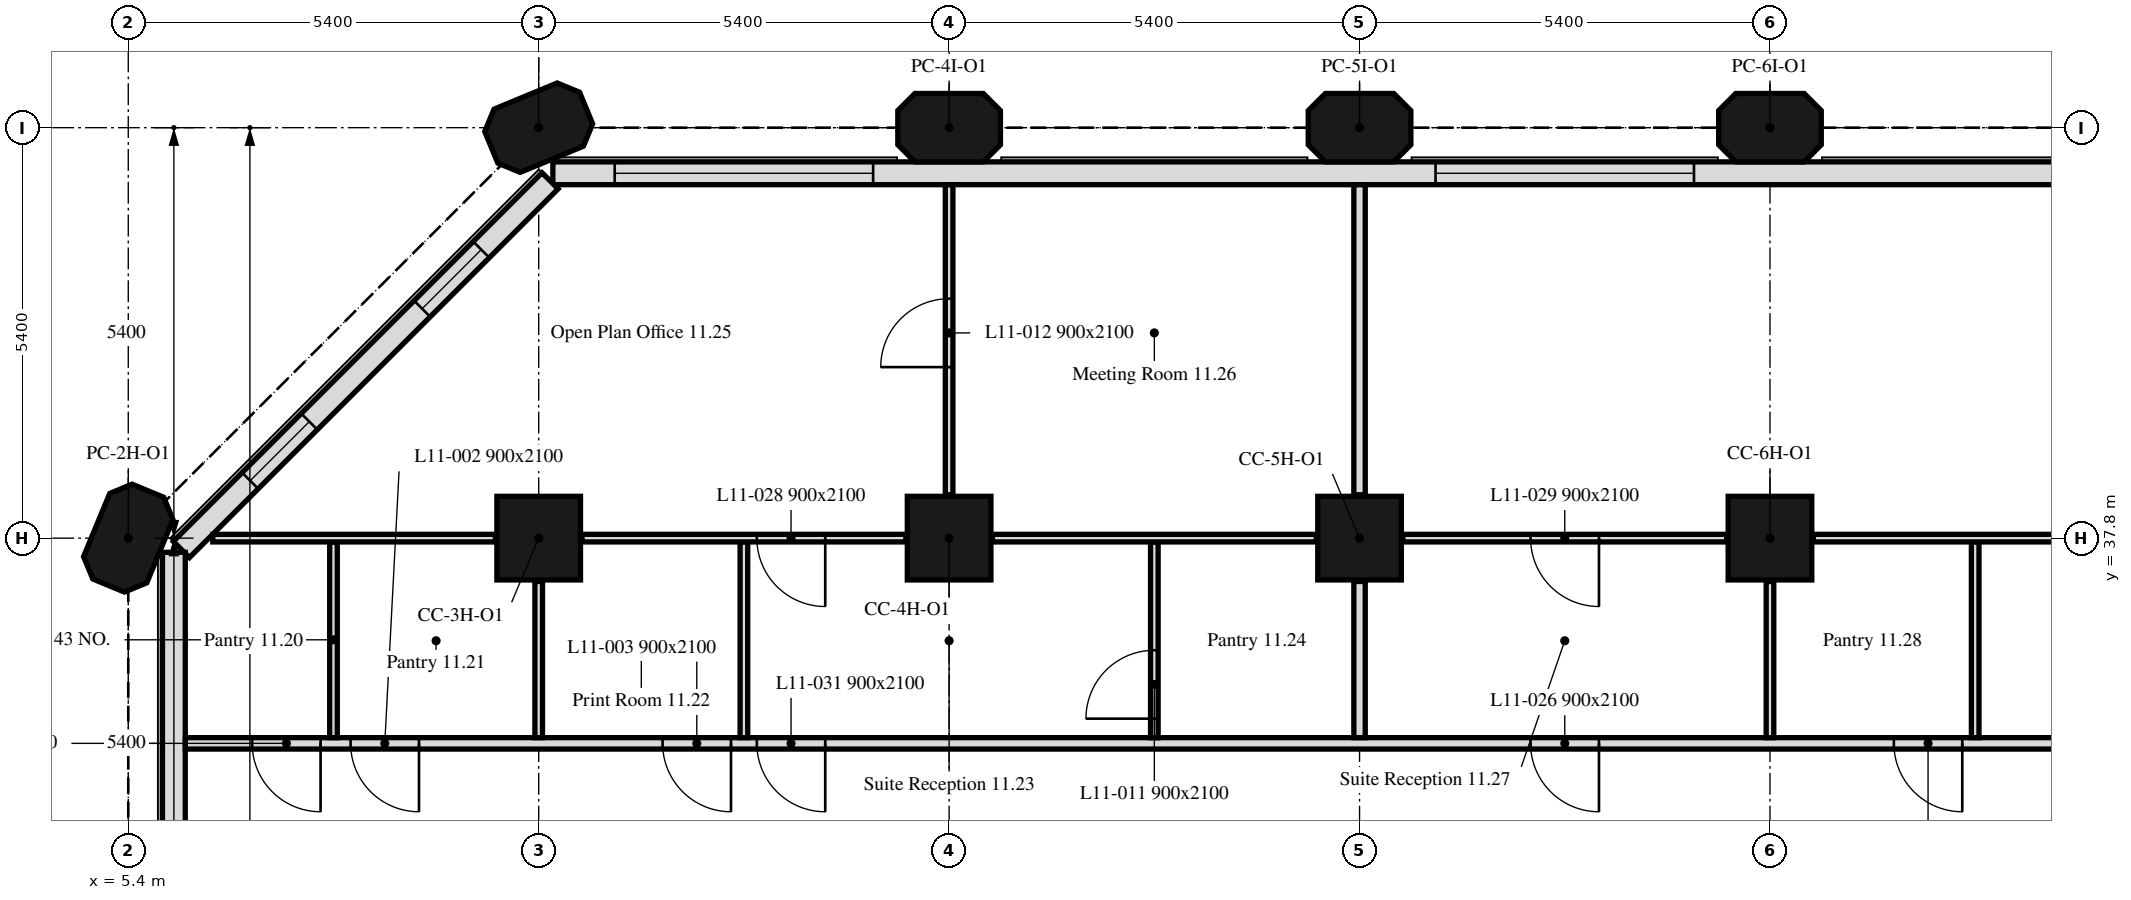
"""IFC4 building model, lengths in metres.
Left out: names, types, materials, properties, quantities, classifications, styles, units other than length and angle.
Written with IfcOpenShell. Run it as: python <this file> out.ifc"""

import sys

from ifc_helpers import new_model, si_unit, direction, frame, frame_2d, origin, origin_2d, place, context, subcontext, project, spatial, polyline, rectangle, outline, extrude, element, fill, save


model = new_model("IFC4")
c1 = context("Model", 3, precision=1e-05, world=origin(), true_north=direction((0.0, 1.0)))
c2 = subcontext(c1, "Body", "Model", "MODEL_VIEW")
j1 = project(units=[si_unit("LENGTHUNIT", "METRE"), si_unit("PLANEANGLEUNIT", "RADIAN")], contexts=[c1])
p1 = place(None, origin())
s1 = spatial("IfcSite", under=j1, at=p1, CompositionType="ELEMENT")
p2 = place(p1, origin())
s2 = spatial("IfcBuilding", under=s1, at=p2, CompositionType="ELEMENT")
p3 = place(p2, frame((0.0, 0.0, 52.6)))
s3 = spatial("IfcBuildingStorey", under=s2, at=p3, CompositionType="ELEMENT", Elevation=52.6)
p4 = place(p3, frame((5.4, 37.8, 0.0), z_axis=(0.0, 0.0, 1.0), x_axis=(0.382683432365, 0.923879532511, 0.0)))
e1 = element("IfcColumn", 1, at=p4, inside=s3, PredefinedType="COLUMN", context=c2, shape_type="SweptSolid", body=[
    extrude(outline(polyline([(-0.45, -0.45), (0.45, -0.45), (0.675, -0.225), (0.675, 0.225), (0.45, 0.45), (-0.45, 0.45), (-0.675, 0.225), (-0.675, -0.225), (-0.45, -0.45)])), origin(), (0.0, 0.0, 1.0), 3.5),
])
for number, where, z_axis, x_axis in (
    (2, (10.8, 37.8, 0.0), (0.0, 0.0, 1.0), (1.0, 0.0, 0.0)),
    (3, (16.2, 37.8, 0.0), (0.0, 0.0, 1.0), (1.0, 0.0, 0.0)),
    (4, (21.6, 37.8, 0.0), (0.0, 0.0, 1.0), (1.0, 0.0, 0.0)),
    (5, (27.0, 37.8, 0.0), (0.0, 0.0, 1.0), (1.0, 0.0, 0.0)),
):
    element("IfcColumn", number, at=place(p3, frame(where, z_axis=z_axis, x_axis=x_axis)), inside=s3, PredefinedType="COLUMN", context=c2, shape_type="SweptSolid", body=[
        extrude(rectangle(XDim=1.1, YDim=1.1, at=origin_2d()), origin(), (0.0, 0.0, 1.0), 3.5),
    ])
for number, where, z_axis, x_axis in (
    (6, (10.8, 43.2, 0.0), (0.0, 0.0, 1.0), (0.924, 0.383, 0.0)),
    (7, (16.2, 43.2, 0.0), (0.0, 0.0, 1.0), (1.0, 0.0, 0.0)),
    (8, (21.6, 43.2, 0.0), (0.0, 0.0, 1.0), (1.0, 0.0, 0.0)),
    (9, (27.0, 43.2, 0.0), (0.0, 0.0, 1.0), (1.0, 0.0, 0.0)),
):
    element("IfcColumn", number, at=place(p3, frame(where, z_axis=z_axis, x_axis=x_axis)), inside=s3, PredefinedType="COLUMN", context=c2, shape_type="SweptSolid", body=[
        extrude(outline(polyline([(-0.45, -0.45), (0.45, -0.45), (0.675, -0.225), (0.675, 0.225), (0.45, 0.45), (-0.45, 0.45), (-0.675, 0.225), (-0.675, -0.225), (-0.45, -0.45)])), origin(), (0.0, 0.0, 1.0), 3.5),
    ])
p5 = place(p3, frame((43.014, 42.6, 0.0), z_axis=(0.0, 0.0, 1.0), x_axis=(-1.0, 0.0, 0.0)))
e10 = element("IfcWall", 10, at=p5, inside=s3, PredefinedType="SOLIDWALL", context=c2, shape_type="SweptSolid", body=[
    extrude(rectangle(XDim=32.027, YDim=0.3, at=frame_2d((16.014, 0.0))), origin(), (0.0, 0.0, 1.0), 3.5),
])
p6 = place(p5, frame((6.214, 0.0, 0.9)))
e11 = element("IfcOpeningElement", 11, at=p6, cuts=e10, PredefinedType="OPENING", context=c2, shape_type="SweptSolid", body=[
    extrude(rectangle(XDim=3.4, YDim=1.7, at=frame_2d((1.7, 0.85))), frame((0.0, 0.16, 0.0), z_axis=(0.0, -1.0, 0.0), x_axis=(1.0, 0.0, 0.0)), (0.0, 0.0, 1.0), 0.32),
])
p7 = place(p5, frame((17.014, 0.0, 0.9)))
e12 = element("IfcOpeningElement", 12, at=p7, cuts=e10, PredefinedType="OPENING", context=c2, shape_type="SweptSolid", body=[
    extrude(rectangle(XDim=3.4, YDim=1.7, at=frame_2d((1.7, 0.85))), frame((0.0, 0.16, 0.0), z_axis=(0.0, -1.0, 0.0), x_axis=(1.0, 0.0, 0.0)), (0.0, 0.0, 1.0), 0.32),
])
p8 = place(p5, frame((27.814, 0.0, 0.9)))
e13 = element("IfcOpeningElement", 13, at=p8, cuts=e10, PredefinedType="OPENING", context=c2, shape_type="SweptSolid", body=[
    extrude(rectangle(XDim=3.4, YDim=1.7, at=frame_2d((1.7, 0.85))), frame((0.0, 0.16, 0.0), z_axis=(0.0, -1.0, 0.0), x_axis=(1.0, 0.0, 0.0)), (0.0, 0.0, 1.0), 0.32),
])
p9 = place(p3, frame((10.949, 42.501, 0.0), z_axis=(0.0, 0.0, 1.0), x_axis=(-0.707106781187, -0.707106781187, 0.0)))
e14 = element("IfcWall", 14, at=p9, inside=s3, PredefinedType="SOLIDWALL", context=c2, shape_type="SweptSolid", body=[
    extrude(rectangle(XDim=6.86, YDim=0.3, at=frame_2d((3.43, 0.0))), origin(), (0.0, 0.0, 1.0), 3.5),
])
p10 = place(p9, frame((1.28, 0.0, 0.9)))
e15 = element("IfcOpeningElement", 15, at=p10, cuts=e14, PredefinedType="OPENING", context=c2, shape_type="SweptSolid", body=[
    extrude(rectangle(XDim=1.1, YDim=1.7, at=frame_2d((0.55, 0.85))), frame((0.0, 0.16, 0.0), z_axis=(0.0, -1.0, 0.0), x_axis=(1.0, 0.0, 0.0)), (0.0, 0.0, 1.0), 0.32),
])
p11 = place(p9, frame((4.48, 0.0, 0.9)))
e16 = element("IfcOpeningElement", 16, at=p11, cuts=e14, PredefinedType="OPENING", context=c2, shape_type="SweptSolid", body=[
    extrude(rectangle(XDim=1.1, YDim=1.7, at=frame_2d((0.55, 0.85))), frame((0.0, 0.16, 0.0), z_axis=(0.0, -1.0, 0.0), x_axis=(1.0, 0.0, 0.0)), (0.0, 0.0, 1.0), 0.32),
])
p12 = place(p3, frame((6.0, 37.614, 0.0), z_axis=(0.0, 0.0, 1.0), x_axis=(0.0, -1.0, 0.0)))
e17 = element("IfcWall", 17, at=p12, inside=s3, PredefinedType="SOLIDWALL", context=c2, shape_type="SweptSolid", body=[
    extrude(rectangle(XDim=5.214, YDim=0.3, at=frame_2d((2.607, 0.0))), origin(), (0.0, 0.0, 1.0), 3.5),
])
p13 = place(p3, frame((45.8, 35.1, 0.0), z_axis=(0.0, 0.0, 1.0), x_axis=(-1.0, 0.0, 0.0)))
e18 = element("IfcWall", 18, at=p13, inside=s3, PredefinedType="PARTITIONING", context=c2, shape_type="SweptSolid", body=[
    extrude(rectangle(XDim=39.649, YDim=0.15, at=frame_2d((19.825, 0.0))), origin(), (0.0, 0.0, 1.0), 3.5),
])
p14 = place(p13, frame((37.87, 0.0, 0.0)))
e19 = element("IfcOpeningElement", 19, at=p14, cuts=e18, PredefinedType="OPENING", context=c2, shape_type="SweptSolid", body=[
    extrude(rectangle(XDim=0.9, YDim=2.1, at=frame_2d((0.45, 1.05))), frame((0.0, 0.075, 0.0), z_axis=(0.0, -1.0, 0.0), x_axis=(1.0, 0.0, 0.0)), (0.0, 0.0, 1.0), 0.15),
])
p15 = place(p13, frame((36.575, 0.0, 0.0)))
e20 = element("IfcOpeningElement", 20, at=p15, cuts=e18, PredefinedType="OPENING", context=c2, shape_type="SweptSolid", body=[
    extrude(rectangle(XDim=0.9, YDim=2.1, at=frame_2d((0.45, 1.05))), frame((0.0, 0.075, 0.0), z_axis=(0.0, -1.0, 0.0), x_axis=(1.0, 0.0, 0.0)), (0.0, 0.0, 1.0), 0.15),
])
p16 = place(p13, frame((32.47, 0.0, 0.0)))
e21 = element("IfcOpeningElement", 21, at=p16, cuts=e18, PredefinedType="OPENING", context=c2, shape_type="SweptSolid", body=[
    extrude(rectangle(XDim=0.9, YDim=2.1, at=frame_2d((0.45, 1.05))), frame((0.0, 0.075, 0.0), z_axis=(0.0, -1.0, 0.0), x_axis=(1.0, 0.0, 0.0)), (0.0, 0.0, 1.0), 0.15),
])
p17 = place(p13, frame((16.27, 0.0, 0.0)))
e22 = element("IfcOpeningElement", 22, at=p17, cuts=e18, PredefinedType="OPENING", context=c2, shape_type="SweptSolid", body=[
    extrude(rectangle(XDim=0.9, YDim=2.1, at=frame_2d((0.45, 1.05))), frame((0.0, 0.075, 0.0), z_axis=(0.0, -1.0, 0.0), x_axis=(1.0, 0.0, 0.0)), (0.0, 0.0, 1.0), 0.15),
])
p18 = place(p13, frame((21.05, 0.0, 0.0)))
e23 = element("IfcOpeningElement", 23, at=p18, cuts=e18, PredefinedType="OPENING", context=c2, shape_type="SweptSolid", body=[
    extrude(rectangle(XDim=0.9, YDim=2.1, at=frame_2d((0.45, 1.05))), frame((0.0, 0.075, 0.0), z_axis=(0.0, -1.0, 0.0), x_axis=(1.0, 0.0, 0.0)), (0.0, 0.0, 1.0), 0.15),
])
p19 = place(p13, frame((31.23, 0.0, 0.0)))
e24 = element("IfcOpeningElement", 24, at=p19, cuts=e18, PredefinedType="OPENING", context=c2, shape_type="SweptSolid", body=[
    extrude(rectangle(XDim=0.9, YDim=2.1, at=frame_2d((0.45, 1.05))), frame((0.0, 0.075, 0.0), z_axis=(0.0, -1.0, 0.0), x_axis=(1.0, 0.0, 0.0)), (0.0, 0.0, 1.0), 0.15),
])
p20 = place(p3, frame((8.1, 35.175, 0.0), z_axis=(0.0, 0.0, 1.0), x_axis=(0.0, 1.0, 0.0)))
e25 = element("IfcWall", 25, at=p20, inside=s3, PredefinedType="PARTITIONING", context=c2, shape_type="SweptSolid", body=[
    extrude(rectangle(XDim=2.575, YDim=0.1, at=frame_2d((1.288, 0.0))), origin(), (0.0, 0.0, 1.0), 3.5),
])
p21 = place(p3, frame((10.8, 35.175, 0.0), z_axis=(0.0, 0.0, 1.0), x_axis=(0.0, 1.0, 0.0)))
e26 = element("IfcWall", 26, at=p21, inside=s3, PredefinedType="PARTITIONING", context=c2, shape_type="SweptSolid", body=[
    extrude(rectangle(XDim=2.055, YDim=0.1, at=frame_2d((1.027, 0.0))), origin(), (0.0, 0.0, 1.0), 3.5),
])
p22 = place(p3, frame((10.23, 37.8, 0.0), z_axis=(0.0, 0.0, 1.0), x_axis=(-1.0, 0.0, 0.0)))
e27 = element("IfcWall", 27, at=p22, inside=s3, PredefinedType="PARTITIONING", context=c2, shape_type="SweptSolid", body=[
    extrude(rectangle(XDim=3.718, YDim=0.1, at=frame_2d((1.859, 0.0))), origin(), (0.0, 0.0, 1.0), 3.5),
])
p23 = place(p3, frame((13.5, 35.175, 0.0), z_axis=(0.0, 0.0, 1.0), x_axis=(0.0, 1.0, 0.0)))
e28 = element("IfcWall", 28, at=p23, inside=s3, PredefinedType="PARTITIONING", context=c2, shape_type="SweptSolid", body=[
    extrude(rectangle(XDim=2.575, YDim=0.1, at=frame_2d((1.288, 0.0))), origin(), (0.0, 0.0, 1.0), 3.5),
])
p24 = place(p3, frame((18.9, 35.175, 0.0), z_axis=(0.0, 0.0, 1.0), x_axis=(0.0, 1.0, 0.0)))
e29 = element("IfcWall", 29, at=p24, inside=s3, PredefinedType="PARTITIONING", context=c2, shape_type="SweptSolid", body=[
    extrude(rectangle(XDim=2.575, YDim=0.1, at=frame_2d((1.288, 0.0))), origin(), (0.0, 0.0, 1.0), 3.5),
])
p25 = place(p24, frame((0.25, 0.0, 0.0)))
e30 = element("IfcOpeningElement", 30, at=p25, cuts=e29, PredefinedType="OPENING", context=c2, shape_type="SweptSolid", body=[
    extrude(rectangle(XDim=0.9, YDim=2.1, at=frame_2d((0.45, 1.05))), frame((0.0, 0.05, 0.0), z_axis=(0.0, -1.0, 0.0), x_axis=(1.0, 0.0, 0.0)), (0.0, 0.0, 1.0), 0.1),
])
p26 = place(p3, frame((15.63, 37.8, 0.0), z_axis=(0.0, 0.0, 1.0), x_axis=(-1.0, 0.0, 0.0)))
e31 = element("IfcWall", 31, at=p26, inside=s3, PredefinedType="PARTITIONING", context=c2, shape_type="SweptSolid", body=[
    extrude(rectangle(XDim=4.26, YDim=0.1, at=frame_2d((2.13, 0.0))), origin(), (0.0, 0.0, 1.0), 3.5),
])
p27 = place(p26, frame((1.06, 0.0, 0.0)))
e32 = element("IfcOpeningElement", 32, at=p27, cuts=e31, PredefinedType="OPENING", context=c2, shape_type="SweptSolid", body=[
    extrude(rectangle(XDim=0.9, YDim=2.1, at=frame_2d((0.45, 1.05))), frame((0.0, 0.05, 0.0), z_axis=(0.0, -1.0, 0.0), x_axis=(1.0, 0.0, 0.0)), (0.0, 0.0, 1.0), 0.1),
])
p28 = place(p3, frame((21.6, 35.175, 0.0), z_axis=(0.0, 0.0, 1.0), x_axis=(0.0, 1.0, 0.0)))
e33 = element("IfcWall", 33, at=p28, inside=s3, PredefinedType="PARTITIONING", context=c2, shape_type="SweptSolid", body=[
    extrude(rectangle(XDim=2.055, YDim=0.15, at=frame_2d((1.027, 0.0))), origin(), (0.0, 0.0, 1.0), 3.5),
])
p29 = place(p3, frame((21.03, 37.8, 0.0), z_axis=(0.0, 0.0, 1.0), x_axis=(-1.0, 0.0, 0.0)))
e34 = element("IfcWall", 34, at=p29, inside=s3, PredefinedType="PARTITIONING", context=c2, shape_type="SweptSolid", body=[
    extrude(rectangle(XDim=4.26, YDim=0.1, at=frame_2d((2.13, 0.0))), origin(), (0.0, 0.0, 1.0), 3.5),
])
p30 = place(p3, frame((16.2, 38.37, 0.0), z_axis=(0.0, 0.0, 1.0), x_axis=(0.0, 1.0, 0.0)))
e35 = element("IfcWall", 35, at=p30, inside=s3, PredefinedType="PARTITIONING", context=c2, shape_type="SweptSolid", body=[
    extrude(rectangle(XDim=4.079, YDim=0.1, at=frame_2d((2.04, 0.0))), origin(), (0.0, 0.0, 1.0), 3.5),
])
p31 = place(p30, frame((1.68, 0.0, 0.0)))
e36 = element("IfcOpeningElement", 36, at=p31, cuts=e35, PredefinedType="OPENING", context=c2, shape_type="SweptSolid", body=[
    extrude(rectangle(XDim=0.9, YDim=2.1, at=frame_2d((0.45, 1.05))), frame((0.0, 0.05, 0.0), z_axis=(0.0, -1.0, 0.0), x_axis=(1.0, 0.0, 0.0)), (0.0, 0.0, 1.0), 0.1),
])
p32 = place(p3, frame((21.6, 38.37, 0.0), z_axis=(0.0, 0.0, 1.0), x_axis=(0.0, 1.0, 0.0)))
e37 = element("IfcWall", 37, at=p32, inside=s3, PredefinedType="PARTITIONING", context=c2, shape_type="SweptSolid", body=[
    extrude(rectangle(XDim=4.079, YDim=0.15, at=frame_2d((2.04, 0.0))), origin(), (0.0, 0.0, 1.0), 3.5),
])
p33 = place(p3, frame((27.0, 35.175, 0.0), z_axis=(0.0, 0.0, 1.0), x_axis=(0.0, 1.0, 0.0)))
e38 = element("IfcWall", 38, at=p33, inside=s3, PredefinedType="PARTITIONING", context=c2, shape_type="SweptSolid", body=[
    extrude(rectangle(XDim=2.055, YDim=0.1, at=frame_2d((1.027, 0.0))), origin(), (0.0, 0.0, 1.0), 3.5),
])
p34 = place(p3, frame((26.43, 37.8, 0.0), z_axis=(0.0, 0.0, 1.0), x_axis=(-1.0, 0.0, 0.0)))
e39 = element("IfcWall", 39, at=p34, inside=s3, PredefinedType="PARTITIONING", context=c2, shape_type="SweptSolid", body=[
    extrude(rectangle(XDim=4.26, YDim=0.1, at=frame_2d((2.13, 0.0))), origin(), (0.0, 0.0, 1.0), 3.5),
])
p35 = place(p34, frame((1.68, 0.0, 0.0)))
e40 = element("IfcOpeningElement", 40, at=p35, cuts=e39, PredefinedType="OPENING", context=c2, shape_type="SweptSolid", body=[
    extrude(rectangle(XDim=0.9, YDim=2.1, at=frame_2d((0.45, 1.05))), frame((0.0, 0.05, 0.0), z_axis=(0.0, -1.0, 0.0), x_axis=(1.0, 0.0, 0.0)), (0.0, 0.0, 1.0), 0.1),
])
p36 = place(p3, frame((29.7, 35.175, 0.0), z_axis=(0.0, 0.0, 1.0), x_axis=(0.0, 1.0, 0.0)))
e41 = element("IfcWall", 41, at=p36, inside=s3, PredefinedType="PARTITIONING", context=c2, shape_type="SweptSolid", body=[
    extrude(rectangle(XDim=2.575, YDim=0.1, at=frame_2d((1.288, 0.0))), origin(), (0.0, 0.0, 1.0), 3.5),
])
p37 = place(p3, frame((31.83, 37.8, 0.0), z_axis=(0.0, 0.0, 1.0), x_axis=(-1.0, 0.0, 0.0)))
e42 = element("IfcWall", 42, at=p37, inside=s3, PredefinedType="PARTITIONING", context=c2, shape_type="SweptSolid", body=[
    extrude(rectangle(XDim=4.26, YDim=0.1, at=frame_2d((2.13, 0.0))), origin(), (0.0, 0.0, 1.0), 3.5),
])
p38 = place(p7, origin())
e43 = element("IfcWindow", 43, at=p38, inside=s3, PartitioningType="SINGLE_PANEL", PredefinedType="WINDOW", context=c2, shape_type="SweptSolid", body=[
    extrude(rectangle(XDim=3.4, YDim=1.7, at=frame_2d((1.7, 0.85))), frame((0.0, 0.03, 0.0), z_axis=(0.0, -1.0, 0.0), x_axis=(1.0, 0.0, 0.0)), (0.0, 0.0, 1.0), 0.06),
])
fill(e12, e43)
p39 = place(p8, origin())
e44 = element("IfcWindow", 44, at=p39, inside=s3, PartitioningType="SINGLE_PANEL", PredefinedType="WINDOW", context=c2, shape_type="SweptSolid", body=[
    extrude(rectangle(XDim=3.4, YDim=1.7, at=frame_2d((1.7, 0.85))), frame((0.0, 0.03, 0.0), z_axis=(0.0, -1.0, 0.0), x_axis=(1.0, 0.0, 0.0)), (0.0, 0.0, 1.0), 0.06),
])
fill(e13, e44)
p40 = place(p10, origin())
e45 = element("IfcWindow", 45, at=p40, inside=s3, PartitioningType="SINGLE_PANEL", PredefinedType="WINDOW", context=c2, shape_type="SweptSolid", body=[
    extrude(rectangle(XDim=1.1, YDim=1.7, at=frame_2d((0.55, 0.85))), frame((0.0, 0.03, 0.0), z_axis=(0.0, -1.0, 0.0), x_axis=(1.0, 0.0, 0.0)), (0.0, 0.0, 1.0), 0.06),
])
fill(e15, e45)
p41 = place(p11, origin())
e46 = element("IfcWindow", 46, at=p41, inside=s3, PartitioningType="SINGLE_PANEL", PredefinedType="WINDOW", context=c2, shape_type="SweptSolid", body=[
    extrude(rectangle(XDim=1.1, YDim=1.7, at=frame_2d((0.55, 0.85))), frame((0.0, 0.03, 0.0), z_axis=(0.0, -1.0, 0.0), x_axis=(1.0, 0.0, 0.0)), (0.0, 0.0, 1.0), 0.06),
])
fill(e16, e46)
p42 = place(p14, origin())
e47 = element("IfcDoor", 47, at=p42, inside=s3, OperationType="SINGLE_SWING_RIGHT", PredefinedType="DOOR", context=c2, shape_type="SweptSolid", body=[
    extrude(rectangle(XDim=0.9, YDim=2.1, at=frame_2d((0.45, 1.05))), frame((0.0, 0.025, 0.0), z_axis=(0.0, -1.0, 0.0), x_axis=(1.0, 0.0, 0.0)), (0.0, 0.0, 1.0), 0.05),
])
fill(e19, e47)
p43 = place(p15, origin())
e48 = element("IfcDoor", 48, at=p43, inside=s3, OperationType="SINGLE_SWING_RIGHT", PredefinedType="DOOR", context=c2, shape_type="SweptSolid", body=[
    extrude(rectangle(XDim=0.9, YDim=2.1, at=frame_2d((0.45, 1.05))), frame((0.0, 0.025, 0.0), z_axis=(0.0, -1.0, 0.0), x_axis=(1.0, 0.0, 0.0)), (0.0, 0.0, 1.0), 0.05),
])
fill(e20, e48)
p44 = place(p16, origin())
e49 = element("IfcDoor", 49, at=p44, inside=s3, OperationType="SINGLE_SWING_RIGHT", PredefinedType="DOOR", context=c2, shape_type="SweptSolid", body=[
    extrude(rectangle(XDim=0.9, YDim=2.1, at=frame_2d((0.45, 1.05))), frame((0.0, 0.025, 0.0), z_axis=(0.0, -1.0, 0.0), x_axis=(1.0, 0.0, 0.0)), (0.0, 0.0, 1.0), 0.05),
])
fill(e21, e49)
p45 = place(p17, origin())
e50 = element("IfcDoor", 50, at=p45, inside=s3, OperationType="SINGLE_SWING_RIGHT", PredefinedType="DOOR", context=c2, shape_type="SweptSolid", body=[
    extrude(rectangle(XDim=0.9, YDim=2.1, at=frame_2d((0.45, 1.05))), frame((0.0, 0.025, 0.0), z_axis=(0.0, -1.0, 0.0), x_axis=(1.0, 0.0, 0.0)), (0.0, 0.0, 1.0), 0.05),
])
fill(e22, e50)
p46 = place(p25, origin())
e51 = element("IfcDoor", 51, at=p46, inside=s3, OperationType="SINGLE_SWING_LEFT", PredefinedType="DOOR", context=c2, shape_type="SweptSolid", body=[
    extrude(rectangle(XDim=0.9, YDim=2.1, at=frame_2d((0.45, 1.05))), frame((0.0, 0.025, 0.0), z_axis=(0.0, -1.0, 0.0), x_axis=(1.0, 0.0, 0.0)), (0.0, 0.0, 1.0), 0.05),
])
fill(e30, e51)
p47 = place(p31, origin())
e52 = element("IfcDoor", 52, at=p47, inside=s3, OperationType="SINGLE_SWING_LEFT", PredefinedType="DOOR", context=c2, shape_type="SweptSolid", body=[
    extrude(rectangle(XDim=0.9, YDim=2.1, at=frame_2d((0.45, 1.05))), frame((0.0, 0.025, 0.0), z_axis=(0.0, -1.0, 0.0), x_axis=(1.0, 0.0, 0.0)), (0.0, 0.0, 1.0), 0.05),
])
fill(e36, e52)
p48 = place(p18, origin())
e53 = element("IfcDoor", 53, at=p48, inside=s3, OperationType="SINGLE_SWING_RIGHT", PredefinedType="DOOR", context=c2, shape_type="SweptSolid", body=[
    extrude(rectangle(XDim=0.9, YDim=2.1, at=frame_2d((0.45, 1.05))), frame((0.0, 0.025, 0.0), z_axis=(0.0, -1.0, 0.0), x_axis=(1.0, 0.0, 0.0)), (0.0, 0.0, 1.0), 0.05),
])
fill(e23, e53)
p49 = place(p27, origin())
e54 = element("IfcDoor", 54, at=p49, inside=s3, OperationType="SINGLE_SWING_LEFT", PredefinedType="DOOR", context=c2, shape_type="SweptSolid", body=[
    extrude(rectangle(XDim=0.9, YDim=2.1, at=frame_2d((0.45, 1.05))), frame((0.0, 0.025, 0.0), z_axis=(0.0, -1.0, 0.0), x_axis=(1.0, 0.0, 0.0)), (0.0, 0.0, 1.0), 0.05),
])
fill(e32, e54)
p50 = place(p35, origin())
e55 = element("IfcDoor", 55, at=p50, inside=s3, OperationType="SINGLE_SWING_RIGHT", PredefinedType="DOOR", context=c2, shape_type="SweptSolid", body=[
    extrude(rectangle(XDim=0.9, YDim=2.1, at=frame_2d((0.45, 1.05))), frame((0.0, 0.025, 0.0), z_axis=(0.0, -1.0, 0.0), x_axis=(1.0, 0.0, 0.0)), (0.0, 0.0, 1.0), 0.05),
])
fill(e40, e55)
p51 = place(p19, origin())
e56 = element("IfcDoor", 56, at=p51, inside=s3, OperationType="SINGLE_SWING_RIGHT", PredefinedType="DOOR", context=c2, shape_type="SweptSolid", body=[
    extrude(rectangle(XDim=0.9, YDim=2.1, at=frame_2d((0.45, 1.05))), frame((0.0, 0.025, 0.0), z_axis=(0.0, -1.0, 0.0), x_axis=(1.0, 0.0, 0.0)), (0.0, 0.0, 1.0), 0.05),
])
fill(e24, e56)
save(model, sys.argv[1])
